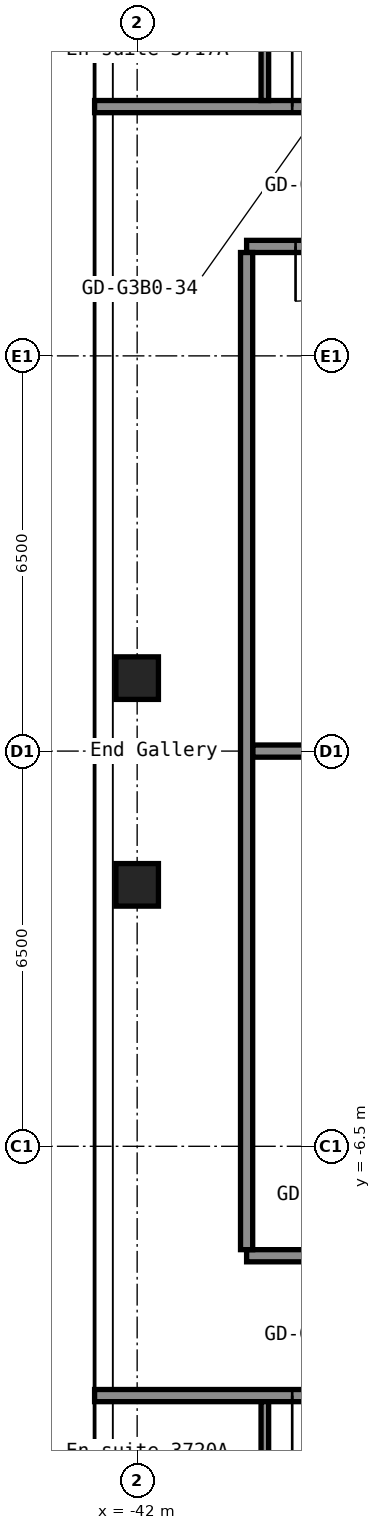
"""IFC4 building model, lengths in metres.
Left out: names, types, materials, properties, quantities, classifications, styles, units other than length and angle.
Written with IfcOpenShell. Run it as: python <this file> out.ifc"""

import sys

from ifc_helpers import new_model, si_unit, direction, frame, frame_2d, origin, origin_2d, place, context, subcontext, project, spatial, rectangle, hollow_rectangle, extrude, element, fill, save


model = new_model("IFC4")
c1 = context("Model", 3, precision=1e-05, world=origin(), true_north=direction((0.0, 1.0)))
c2 = subcontext(c1, "Body", "Model", "MODEL_VIEW")
j1 = project(units=[si_unit("LENGTHUNIT", "METRE"), si_unit("PLANEANGLEUNIT", "RADIAN")], contexts=[c1])
p1 = place(None, origin())
s1 = spatial("IfcSite", under=j1, at=p1, CompositionType="ELEMENT")
p2 = place(p1, origin())
s2 = spatial("IfcBuilding", under=s1, at=p2, CompositionType="ELEMENT")
p3 = place(p2, frame((0.0, 0.0, 134.2)))
s3 = spatial("IfcBuildingStorey", under=s2, at=p3, CompositionType="ELEMENT", Elevation=134.2)
for number, where, z_axis, x_axis in (
    (1, (-42.0, -2.2, 0.0), (0.0, 0.0, 1.0), (1.0, 0.0, 0.0)),
    (2, (-42.0, 1.2, 0.0), (0.0, 0.0, 1.0), (1.0, 0.0, 0.0)),
):
    element("IfcColumn", number, at=place(p3, frame(where, z_axis=z_axis, x_axis=x_axis)), inside=s3, PredefinedType="COLUMN", context=c2, shape_type="SweptSolid", body=[
        extrude(hollow_rectangle(XDim=0.7, YDim=0.7, WallThickness=0.028, at=origin_2d()), origin(), (0.0, 0.0, 1.0), 2.75),
    ])
p4 = place(p3, frame((-42.7, -10.6, 0.0), z_axis=(0.0, 0.0, 1.0), x_axis=(1.0, 0.0, 0.0)))
e3 = element("IfcWall", 3, at=p4, inside=s3, PredefinedType="PARTITIONING", context=c2, shape_type="SweptSolid", body=[
    extrude(rectangle(XDim=25.9, YDim=0.2, at=frame_2d((12.95, 0.0))), origin(), (0.0, 0.0, 1.0), 2.75),
])
p5 = place(p4, frame((3.25, 0.0, 0.0)))
e4 = element("IfcOpeningElement", 4, at=p5, cuts=e3, PredefinedType="OPENING", context=c2, shape_type="SweptSolid", body=[
    extrude(rectangle(XDim=1.0, YDim=2.1, at=frame_2d((0.5, 1.05))), frame((0.0, 0.11, 0.0), z_axis=(0.0, -1.0, 0.0), x_axis=(1.0, 0.0, 0.0)), (0.0, 0.0, 1.0), 0.22),
])
p6 = place(p4, frame((5.15, 0.0, 0.0)))
e5 = element("IfcOpeningElement", 5, at=p6, cuts=e3, PredefinedType="OPENING", context=c2, shape_type="SweptSolid", body=[
    extrude(rectangle(XDim=1.0, YDim=2.1, at=frame_2d((0.5, 1.05))), frame((0.0, 0.11, 0.0), z_axis=(0.0, -1.0, 0.0), x_axis=(1.0, 0.0, 0.0)), (0.0, 0.0, 1.0), 0.22),
])
p7 = place(p4, frame((11.95, 0.0, 0.0)))
e6 = element("IfcOpeningElement", 6, at=p7, cuts=e3, PredefinedType="OPENING", context=c2, shape_type="SweptSolid", body=[
    extrude(rectangle(XDim=1.0, YDim=2.1, at=frame_2d((0.5, 1.05))), frame((0.0, 0.11, 0.0), z_axis=(0.0, -1.0, 0.0), x_axis=(1.0, 0.0, 0.0)), (0.0, 0.0, 1.0), 0.22),
])
p8 = place(p4, frame((13.65, 0.0, 0.0)))
e7 = element("IfcOpeningElement", 7, at=p8, cuts=e3, PredefinedType="OPENING", context=c2, shape_type="SweptSolid", body=[
    extrude(rectangle(XDim=1.0, YDim=2.1, at=frame_2d((0.5, 1.05))), frame((0.0, 0.11, 0.0), z_axis=(0.0, -1.0, 0.0), x_axis=(1.0, 0.0, 0.0)), (0.0, 0.0, 1.0), 0.22),
])
p9 = place(p4, frame((20.35, 0.0, 0.0)))
e8 = element("IfcOpeningElement", 8, at=p9, cuts=e3, PredefinedType="OPENING", context=c2, shape_type="SweptSolid", body=[
    extrude(rectangle(XDim=1.0, YDim=2.1, at=frame_2d((0.5, 1.05))), frame((0.0, 0.11, 0.0), z_axis=(0.0, -1.0, 0.0), x_axis=(1.0, 0.0, 0.0)), (0.0, 0.0, 1.0), 0.22),
])
p10 = place(p4, frame((22.05, 0.0, 0.0)))
e9 = element("IfcOpeningElement", 9, at=p10, cuts=e3, PredefinedType="OPENING", context=c2, shape_type="SweptSolid", body=[
    extrude(rectangle(XDim=1.0, YDim=2.1, at=frame_2d((0.5, 1.05))), frame((0.0, 0.11, 0.0), z_axis=(0.0, -1.0, 0.0), x_axis=(1.0, 0.0, 0.0)), (0.0, 0.0, 1.0), 0.22),
])
p11 = place(p3, frame((-40.2, -8.3, 0.0), z_axis=(0.0, 0.0, 1.0), x_axis=(1.0, 0.0, 0.0)))
e10 = element("IfcWall", 10, at=p11, inside=s3, PredefinedType="PARTITIONING", context=c2, shape_type="SweptSolid", body=[
    extrude(rectangle(XDim=6.6, YDim=0.2, at=frame_2d((3.3, 0.0))), origin(), (0.0, 0.0, 1.0), 2.75),
])
p12 = place(p11, frame((1.0, 0.0, 0.0)))
e11 = element("IfcOpeningElement", 11, at=p12, cuts=e10, PredefinedType="OPENING", context=c2, shape_type="SweptSolid", body=[
    extrude(rectangle(XDim=0.9, YDim=2.1, at=frame_2d((0.45, 1.05))), frame((0.0, 0.11, 0.0), z_axis=(0.0, -1.0, 0.0), x_axis=(1.0, 0.0, 0.0)), (0.0, 0.0, 1.0), 0.22),
])
p13 = place(p11, frame((4.3, 0.0, 0.0)))
e12 = element("IfcOpeningElement", 12, at=p13, cuts=e10, PredefinedType="OPENING", context=c2, shape_type="SweptSolid", body=[
    extrude(rectangle(XDim=0.9, YDim=2.1, at=frame_2d((0.45, 1.05))), frame((0.0, 0.11, 0.0), z_axis=(0.0, -1.0, 0.0), x_axis=(1.0, 0.0, 0.0)), (0.0, 0.0, 1.0), 0.22),
])
p14 = place(p3, frame((-40.1, 0.0, 0.0), z_axis=(0.0, 0.0, 1.0), x_axis=(1.0, 0.0, 0.0)))
e13 = element("IfcWall", 13, at=p14, inside=s3, PredefinedType="PARTITIONING", context=c2, shape_type="SweptSolid", body=[
    extrude(rectangle(XDim=6.5, YDim=0.2, at=frame_2d((3.25, 0.0))), origin(), (0.0, 0.0, 1.0), 2.75),
])
p15 = place(p3, frame((-40.2, 8.3, 0.0), z_axis=(0.0, 0.0, 1.0), x_axis=(1.0, 0.0, 0.0)))
e14 = element("IfcWall", 14, at=p15, inside=s3, PredefinedType="PARTITIONING", context=c2, shape_type="SweptSolid", body=[
    extrude(rectangle(XDim=6.6, YDim=0.2, at=frame_2d((3.3, 0.0))), origin(), (0.0, 0.0, 1.0), 2.75),
])
p16 = place(p15, frame((0.805, 0.0, 0.0)))
e15 = element("IfcOpeningElement", 15, at=p16, cuts=e14, PredefinedType="OPENING", context=c2, shape_type="SweptSolid", body=[
    extrude(rectangle(XDim=0.9, YDim=2.1, at=frame_2d((0.45, 1.05))), frame((0.0, 0.11, 0.0), z_axis=(0.0, -1.0, 0.0), x_axis=(1.0, 0.0, 0.0)), (0.0, 0.0, 1.0), 0.22),
])
p17 = place(p15, frame((4.105, 0.0, 0.0)))
e16 = element("IfcOpeningElement", 16, at=p17, cuts=e14, PredefinedType="OPENING", context=c2, shape_type="SweptSolid", body=[
    extrude(rectangle(XDim=0.9, YDim=2.1, at=frame_2d((0.45, 1.05))), frame((0.0, 0.11, 0.0), z_axis=(0.0, -1.0, 0.0), x_axis=(1.0, 0.0, 0.0)), (0.0, 0.0, 1.0), 0.22),
])
p18 = place(p3, frame((-42.7, 10.6, 0.0), z_axis=(0.0, 0.0, 1.0), x_axis=(1.0, 0.0, 0.0)))
e17 = element("IfcWall", 17, at=p18, inside=s3, PredefinedType="PARTITIONING", context=c2, shape_type="SweptSolid", body=[
    extrude(rectangle(XDim=25.9, YDim=0.2, at=frame_2d((12.95, 0.0))), origin(), (0.0, 0.0, 1.0), 2.75),
])
p19 = place(p18, frame((3.25, 0.0, 0.0)))
e18 = element("IfcOpeningElement", 18, at=p19, cuts=e17, PredefinedType="OPENING", context=c2, shape_type="SweptSolid", body=[
    extrude(rectangle(XDim=1.0, YDim=2.1, at=frame_2d((0.5, 1.05))), frame((0.0, 0.11, 0.0), z_axis=(0.0, -1.0, 0.0), x_axis=(1.0, 0.0, 0.0)), (0.0, 0.0, 1.0), 0.22),
])
p20 = place(p18, frame((5.15, 0.0, 0.0)))
e19 = element("IfcOpeningElement", 19, at=p20, cuts=e17, PredefinedType="OPENING", context=c2, shape_type="SweptSolid", body=[
    extrude(rectangle(XDim=1.0, YDim=2.1, at=frame_2d((0.5, 1.05))), frame((0.0, 0.11, 0.0), z_axis=(0.0, -1.0, 0.0), x_axis=(1.0, 0.0, 0.0)), (0.0, 0.0, 1.0), 0.22),
])
p21 = place(p18, frame((11.95, 0.0, 0.0)))
e20 = element("IfcOpeningElement", 20, at=p21, cuts=e17, PredefinedType="OPENING", context=c2, shape_type="SweptSolid", body=[
    extrude(rectangle(XDim=1.0, YDim=2.1, at=frame_2d((0.5, 1.05))), frame((0.0, 0.11, 0.0), z_axis=(0.0, -1.0, 0.0), x_axis=(1.0, 0.0, 0.0)), (0.0, 0.0, 1.0), 0.22),
])
p22 = place(p18, frame((13.65, 0.0, 0.0)))
e21 = element("IfcOpeningElement", 21, at=p22, cuts=e17, PredefinedType="OPENING", context=c2, shape_type="SweptSolid", body=[
    extrude(rectangle(XDim=1.0, YDim=2.1, at=frame_2d((0.5, 1.05))), frame((0.0, 0.11, 0.0), z_axis=(0.0, -1.0, 0.0), x_axis=(1.0, 0.0, 0.0)), (0.0, 0.0, 1.0), 0.22),
])
p23 = place(p18, frame((20.35, 0.0, 0.0)))
e22 = element("IfcOpeningElement", 22, at=p23, cuts=e17, PredefinedType="OPENING", context=c2, shape_type="SweptSolid", body=[
    extrude(rectangle(XDim=1.0, YDim=2.1, at=frame_2d((0.5, 1.05))), frame((0.0, 0.11, 0.0), z_axis=(0.0, -1.0, 0.0), x_axis=(1.0, 0.0, 0.0)), (0.0, 0.0, 1.0), 0.22),
])
p24 = place(p18, frame((22.05, 0.0, 0.0)))
e23 = element("IfcOpeningElement", 23, at=p24, cuts=e17, PredefinedType="OPENING", context=c2, shape_type="SweptSolid", body=[
    extrude(rectangle(XDim=1.0, YDim=2.1, at=frame_2d((0.5, 1.05))), frame((0.0, 0.11, 0.0), z_axis=(0.0, -1.0, 0.0), x_axis=(1.0, 0.0, 0.0)), (0.0, 0.0, 1.0), 0.22),
])
p25 = place(p3, frame((-40.2, -8.2, 0.0), z_axis=(0.0, 0.0, 1.0), x_axis=(0.0, 1.0, 0.0)))
e24 = element("IfcWall", 24, at=p25, inside=s3, PredefinedType="PARTITIONING", context=c2, shape_type="SweptSolid", body=[
    extrude(rectangle(XDim=16.4, YDim=0.2, at=frame_2d((8.2, 0.0))), origin(), (0.0, 0.0, 1.0), 2.75),
])
p26 = place(p3, frame((-39.9, -13.6, 0.0), z_axis=(0.0, 0.0, 1.0), x_axis=(0.0, 1.0, 0.0)))
e25 = element("IfcWall", 25, at=p26, inside=s3, PredefinedType="PARTITIONING", context=c2, shape_type="SweptSolid", body=[
    extrude(rectangle(XDim=2.9, YDim=0.125, at=frame_2d((1.45, 0.0))), origin(), (0.0, 0.0, 1.0), 2.75),
])
p27 = place(p26, frame((0.6, 0.0, 0.0)))
e26 = element("IfcOpeningElement", 26, at=p27, cuts=e25, PredefinedType="OPENING", context=c2, shape_type="SweptSolid", body=[
    extrude(rectangle(XDim=0.8, YDim=2.1, at=frame_2d((0.4, 1.05))), frame((0.0, 0.073, 0.0), z_axis=(0.0, -1.0, 0.0), x_axis=(1.0, 0.0, 0.0)), (0.0, 0.0, 1.0), 0.145),
])
p28 = place(p3, frame((-39.9, 10.7, 0.0), z_axis=(0.0, 0.0, 1.0), x_axis=(0.0, 1.0, 0.0)))
e27 = element("IfcWall", 27, at=p28, inside=s3, PredefinedType="PARTITIONING", context=c2, shape_type="SweptSolid", body=[
    extrude(rectangle(XDim=2.9, YDim=0.125, at=frame_2d((1.45, 0.0))), origin(), (0.0, 0.0, 1.0), 2.75),
])
p29 = place(p28, frame((1.5, 0.0, 0.0)))
e28 = element("IfcOpeningElement", 28, at=p29, cuts=e27, PredefinedType="OPENING", context=c2, shape_type="SweptSolid", body=[
    extrude(rectangle(XDim=0.8, YDim=2.1, at=frame_2d((0.4, 1.05))), frame((0.0, 0.073, 0.0), z_axis=(0.0, -1.0, 0.0), x_axis=(1.0, 0.0, 0.0)), (0.0, 0.0, 1.0), 0.145),
])
p30 = place(p5, origin())
e29 = element("IfcDoor", 29, at=p30, inside=s3, OperationType="SINGLE_SWING_LEFT", PredefinedType="DOOR", context=c2, shape_type="SweptSolid", body=[
    extrude(rectangle(XDim=1.0, YDim=2.1, at=frame_2d((0.5, 1.05))), frame((0.0, 0.025, 0.0), z_axis=(0.0, -1.0, 0.0), x_axis=(1.0, 0.0, 0.0)), (0.0, 0.0, 1.0), 0.05),
])
fill(e4, e29)
p31 = place(p16, origin())
e30 = element("IfcDoor", 30, at=p31, inside=s3, OperationType="SINGLE_SWING_LEFT", PredefinedType="DOOR", context=c2, shape_type="SweptSolid", body=[
    extrude(rectangle(XDim=0.9, YDim=2.1, at=frame_2d((0.45, 1.05))), frame((0.0, 0.025, 0.0), z_axis=(0.0, -1.0, 0.0), x_axis=(1.0, 0.0, 0.0)), (0.0, 0.0, 1.0), 0.05),
])
fill(e15, e30)
p32 = place(p19, origin())
e31 = element("IfcDoor", 31, at=p32, inside=s3, OperationType="SINGLE_SWING_RIGHT", PredefinedType="DOOR", context=c2, shape_type="SweptSolid", body=[
    extrude(rectangle(XDim=1.0, YDim=2.1, at=frame_2d((0.5, 1.05))), frame((0.0, 0.025, 0.0), z_axis=(0.0, -1.0, 0.0), x_axis=(1.0, 0.0, 0.0)), (0.0, 0.0, 1.0), 0.05),
])
fill(e18, e31)
save(model, sys.argv[1])
